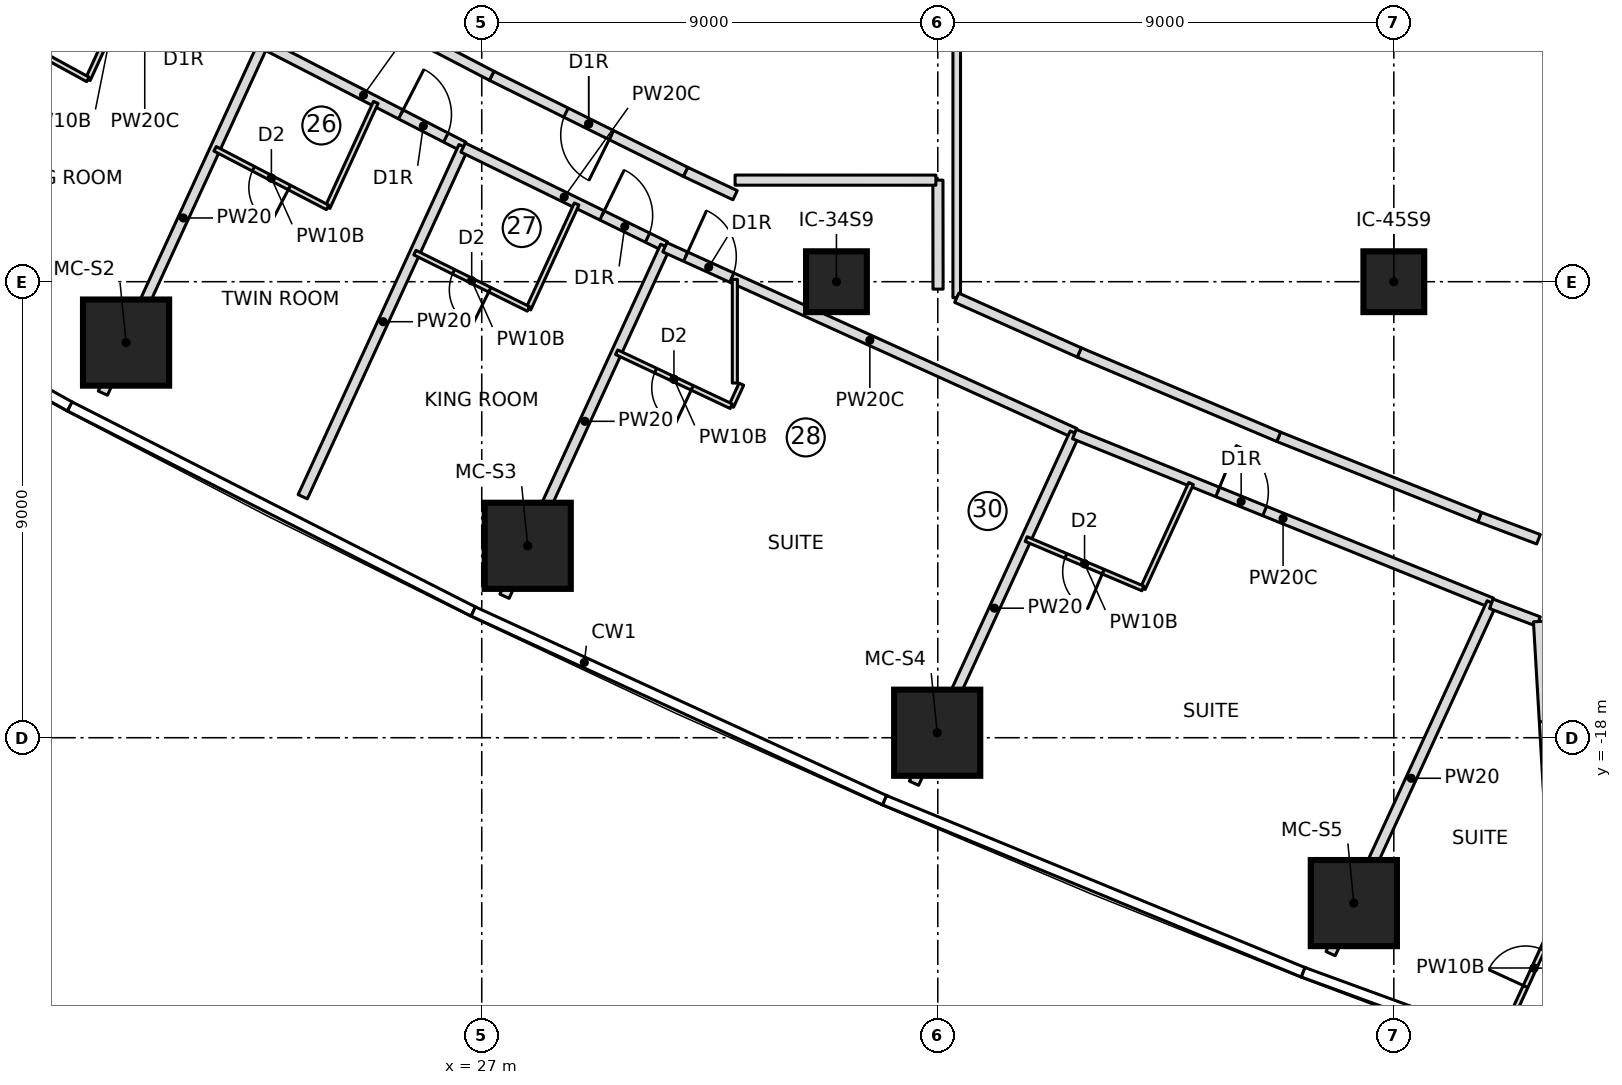
"""IFC4 building model, lengths in metres.
Left out: names, types, materials, properties, quantities, classifications, styles, units other than length and angle.
Written with IfcOpenShell. Run it as: python <this file> out.ifc"""

import sys

from ifc_helpers import new_model, si_unit, direction, frame, frame_2d, origin, origin_2d, place, context, subcontext, project, spatial, rectangle, extrude, element, fill, save


model = new_model("IFC4")
c1 = context("Model", 3, precision=1e-05, world=origin(), true_north=direction((0.0, 1.0)))
c2 = subcontext(c1, "Body", "Model", "MODEL_VIEW")
j1 = project(units=[si_unit("LENGTHUNIT", "METRE"), si_unit("PLANEANGLEUNIT", "RADIAN")], contexts=[c1])
p1 = place(None, origin())
s1 = spatial("IfcSite", under=j1, at=p1, CompositionType="ELEMENT")
p2 = place(p1, origin())
s2 = spatial("IfcBuilding", under=s1, at=p2, CompositionType="ELEMENT")
p3 = place(p2, frame((0.0, 0.0, 95.55)))
s3 = spatial("IfcBuildingStorey", under=s2, at=p3, CompositionType="ELEMENT", Elevation=95.55)
for number, where, z_axis, x_axis in (
    (1, (19.981, -10.202, 0.0), (0.0, 0.0, 1.0), (1.0, 0.0, 0.0)),
    (2, (27.907, -14.212, 0.0), (0.0, 0.0, 1.0), (1.0, 0.0, 0.0)),
    (3, (35.988, -17.902, 0.0), (0.0, 0.0, 1.0), (1.0, 0.0, 0.0)),
    (4, (44.211, -21.264, 0.0), (0.0, 0.0, 1.0), (1.0, 0.0, 0.0)),
):
    element("IfcColumn", number, at=place(p3, frame(where, z_axis=z_axis, x_axis=x_axis)), inside=s3, PredefinedType="COLUMN", context=c2, shape_type="SweptSolid", body=[
        extrude(rectangle(XDim=1.7, YDim=1.7, at=origin_2d()), origin(), (0.0, 0.0, 1.0), 3.55),
    ])
for number, where, z_axis, x_axis in (
    (5, (34.0, -9.0, 0.0), (0.0, 0.0, 1.0), (1.0, 0.0, 0.0)),
    (6, (45.0, -9.0, 0.0), (0.0, 0.0, 1.0), (1.0, 0.0, 0.0)),
):
    element("IfcColumn", number, at=place(p3, frame(where, z_axis=z_axis, x_axis=x_axis)), inside=s3, PredefinedType="COLUMN", context=c2, shape_type="SweptSolid", body=[
        extrude(rectangle(XDim=1.2, YDim=1.2, at=origin_2d()), origin(), (0.0, 0.0, 1.0), 3.55),
    ])
p4 = place(p3, frame((20.18, -2.934, 0.0), z_axis=(0.0, 0.0, 1.0), x_axis=(-0.417450047292, -0.908699872354, 0.0)))
e7 = element("IfcWall", 7, at=p4, inside=s3, PredefinedType="PARTITIONING", context=c2, shape_type="SweptSolid", body=[
    extrude(rectangle(XDim=2.283, YDim=0.1, at=frame_2d((1.141, 0.0))), origin(), (0.0, 0.0, 1.0), 3.25),
])
p5 = place(p4, frame((0.75, 0.0, 0.0)))
e8 = element("IfcOpeningElement", 8, at=p5, cuts=e7, PredefinedType="OPENING", context=c2, shape_type="SweptSolid", body=[
    extrude(rectangle(XDim=0.8, YDim=2.1, at=frame_2d((0.4, 1.05))), frame((0.0, 0.06, 0.0), z_axis=(0.0, -1.0, 0.0), x_axis=(1.0, 0.0, 0.0)), (0.0, 0.0, 1.0), 0.12),
])
p6 = place(p3, frame((19.228, -5.008, 0.0), z_axis=(0.0, 0.0, 1.0), x_axis=(-0.877424481957, 0.479714788663, 0.0)))
e9 = element("IfcWall", 9, at=p6, inside=s3, PredefinedType="PARTITIONING", context=c2, shape_type="SweptSolid", body=[
    extrude(rectangle(XDim=1.625, YDim=0.1, at=frame_2d((0.813, 0.0))), origin(), (0.0, 0.0, 1.0), 3.25),
])
p7 = place(p3, frame((19.522, -11.199, 0.0), z_axis=(0.0, 0.0, 1.0), x_axis=(0.417413534969, 0.908716644959, 0.0)))
e10 = element("IfcWall", 10, at=p7, inside=s3, PredefinedType="PARTITIONING", context=c2, shape_type="SweptSolid", body=[
    extrude(rectangle(XDim=7.609, YDim=0.2, at=frame_2d((3.805, 0.0))), origin(), (0.0, 0.0, 1.0), 3.25),
])
p8 = place(p3, frame((22.69, -4.302, 0.0), z_axis=(0.0, 0.0, 1.0), x_axis=(0.889236075961, -0.457448577667, 0.0)))
e11 = element("IfcWall", 11, at=p8, inside=s3, PredefinedType="PARTITIONING", context=c2, shape_type="SweptSolid", body=[
    extrude(rectangle(XDim=4.443, YDim=0.2, at=frame_2d((2.222, 0.0))), origin(), (0.0, 0.0, 1.0), 3.25),
])
p9 = place(p8, frame((3.05, 0.0, 0.0)))
e12 = element("IfcOpeningElement", 12, at=p9, cuts=e11, PredefinedType="OPENING", context=c2, shape_type="SweptSolid", body=[
    extrude(rectangle(XDim=1.0, YDim=2.1, at=frame_2d((0.5, 1.05))), frame((0.0, 0.11, 0.0), z_axis=(0.0, -1.0, 0.0), x_axis=(1.0, 0.0, 0.0)), (0.0, 0.0, 1.0), 0.22),
])
p10 = place(p3, frame((24.909, -5.462, 0.0), z_axis=(0.0, 0.0, 1.0), x_axis=(-0.417454762401, -0.908697706253, 0.0)))
e13 = element("IfcWall", 13, at=p10, inside=s3, PredefinedType="PARTITIONING", context=c2, shape_type="SweptSolid", body=[
    extrude(rectangle(XDim=2.28, YDim=0.1, at=frame_2d((1.14, 0.0))), origin(), (0.0, 0.0, 1.0), 3.25),
])
p11 = place(p3, frame((23.958, -7.533, 0.0), z_axis=(0.0, 0.0, 1.0), x_axis=(-0.886911586599, 0.461939214135, 0.0)))
e14 = element("IfcWall", 14, at=p11, inside=s3, PredefinedType="PARTITIONING", context=c2, shape_type="SweptSolid", body=[
    extrude(rectangle(XDim=2.503, YDim=0.1, at=frame_2d((1.251, 0.0))), origin(), (0.0, 0.0, 1.0), 3.25),
])
p12 = place(p11, frame((0.85, 0.0, 0.0)))
e15 = element("IfcOpeningElement", 15, at=p12, cuts=e14, PredefinedType="OPENING", context=c2, shape_type="SweptSolid", body=[
    extrude(rectangle(XDim=0.8, YDim=2.1, at=frame_2d((0.4, 1.05))), frame((0.0, 0.06, 0.0), z_axis=(0.0, -1.0, 0.0), x_axis=(1.0, 0.0, 0.0)), (0.0, 0.0, 1.0), 0.12),
])
p13 = place(p3, frame((23.467, -13.244, 0.0), z_axis=(0.0, 0.0, 1.0), x_axis=(0.417455028008, 0.908697584233, 0.0)))
e16 = element("IfcWall", 16, at=p13, inside=s3, PredefinedType="PARTITIONING", context=c2, shape_type="SweptSolid", body=[
    extrude(rectangle(XDim=7.603, YDim=0.2, at=frame_2d((3.802, 0.0))), origin(), (0.0, 0.0, 1.0), 3.25),
])
p14 = place(p3, frame((26.633, -6.353, 0.0), z_axis=(0.0, 0.0, 1.0), x_axis=(0.898502457097, -0.438968489291, 0.0)))
e17 = element("IfcWall", 17, at=p14, inside=s3, PredefinedType="PARTITIONING", context=c2, shape_type="SweptSolid", body=[
    extrude(rectangle(XDim=4.44, YDim=0.2, at=frame_2d((2.22, 0.0))), origin(), (0.0, 0.0, 1.0), 3.25),
])
p15 = place(p14, frame((3.05, 0.0, 0.0)))
e18 = element("IfcOpeningElement", 18, at=p15, cuts=e17, PredefinedType="OPENING", context=c2, shape_type="SweptSolid", body=[
    extrude(rectangle(XDim=1.0, YDim=2.1, at=frame_2d((0.5, 1.05))), frame((0.0, 0.11, 0.0), z_axis=(0.0, -1.0, 0.0), x_axis=(1.0, 0.0, 0.0)), (0.0, 0.0, 1.0), 0.22),
])
p16 = place(p3, frame((28.873, -7.467, 0.0), z_axis=(0.0, 0.0, 1.0), x_axis=(-0.417433204355, -0.908707609686, 0.0)))
e19 = element("IfcWall", 19, at=p16, inside=s3, PredefinedType="PARTITIONING", context=c2, shape_type="SweptSolid", body=[
    extrude(rectangle(XDim=2.278, YDim=0.1, at=frame_2d((1.139, 0.0))), origin(), (0.0, 0.0, 1.0), 3.25),
])
p17 = place(p3, frame((27.922, -9.537, 0.0), z_axis=(0.0, 0.0, 1.0), x_axis=(-0.895944857815, 0.444165297784, 0.0)))
e20 = element("IfcWall", 20, at=p17, inside=s3, PredefinedType="PARTITIONING", context=c2, shape_type="SweptSolid", body=[
    extrude(rectangle(XDim=2.501, YDim=0.1, at=frame_2d((1.25, 0.0))), origin(), (0.0, 0.0, 1.0), 3.25),
])
p18 = place(p17, frame((0.85, 0.0, 0.0)))
e21 = element("IfcOpeningElement", 21, at=p18, cuts=e20, PredefinedType="OPENING", context=c2, shape_type="SweptSolid", body=[
    extrude(rectangle(XDim=0.8, YDim=2.1, at=frame_2d((0.4, 1.05))), frame((0.0, 0.06, 0.0), z_axis=(0.0, -1.0, 0.0), x_axis=(1.0, 0.0, 0.0)), (0.0, 0.0, 1.0), 0.12),
])
p19 = place(p3, frame((27.449, -15.208, 0.0), z_axis=(0.0, 0.0, 1.0), x_axis=(0.417429919618, 0.90870911859, 0.0)))
e22 = element("IfcWall", 22, at=p19, inside=s3, PredefinedType="PARTITIONING", context=c2, shape_type="SweptSolid", body=[
    extrude(rectangle(XDim=7.6, YDim=0.2, at=frame_2d((3.8, 0.0))), origin(), (0.0, 0.0, 1.0), 3.25),
])
p20 = place(p3, frame((30.614, -8.32, 0.0), z_axis=(0.0, 0.0, 1.0), x_axis=(0.910751030363, -0.41295588226, 0.0)))
e23 = element("IfcWall", 23, at=p20, inside=s3, PredefinedType="PARTITIONING", context=c2, shape_type="SweptSolid", body=[
    extrude(rectangle(XDim=8.883, YDim=0.2, at=frame_2d((4.442, 0.0))), origin(), (0.0, 0.0, 1.0), 3.25),
])
p21 = place(p20, frame((0.45, 0.0, 0.0)))
e24 = element("IfcOpeningElement", 24, at=p21, cuts=e23, PredefinedType="OPENING", context=c2, shape_type="SweptSolid", body=[
    extrude(rectangle(XDim=1.0, YDim=2.1, at=frame_2d((0.5, 1.05))), frame((0.0, 0.11, 0.0), z_axis=(0.0, -1.0, 0.0), x_axis=(1.0, 0.0, 0.0)), (0.0, 0.0, 1.0), 0.22),
])
p22 = place(p3, frame((32.124, -11.022, 0.0), z_axis=(0.0, 0.0, 1.0), x_axis=(-0.4176025781, -0.908629785316, 0.0)))
e25 = element("IfcWall", 25, at=p22, inside=s3, PredefinedType="PARTITIONING", context=c2, shape_type="SweptSolid", body=[
    extrude(rectangle(XDim=0.479, YDim=0.1, at=frame_2d((0.239, 0.0))), origin(), (0.0, 0.0, 1.0), 3.25),
])
p23 = place(p3, frame((31.924, -11.457, 0.0), z_axis=(0.0, 0.0, 1.0), x_axis=(-0.904688082375, 0.426074493027, 0.0)))
e26 = element("IfcWall", 26, at=p23, inside=s3, PredefinedType="PARTITIONING", context=c2, shape_type="SweptSolid", body=[
    extrude(rectangle(XDim=2.5, YDim=0.1, at=frame_2d((1.25, 0.0))), origin(), (0.0, 0.0, 1.0), 3.25),
])
p24 = place(p23, frame((0.85, 0.0, 0.0)))
e27 = element("IfcOpeningElement", 27, at=p24, cuts=e26, PredefinedType="OPENING", context=c2, shape_type="SweptSolid", body=[
    extrude(rectangle(XDim=0.8, YDim=2.1, at=frame_2d((0.4, 1.05))), frame((0.0, 0.06, 0.0), z_axis=(0.0, -1.0, 0.0), x_axis=(1.0, 0.0, 0.0)), (0.0, 0.0, 1.0), 0.12),
])
p25 = place(p3, frame((35.531, -18.898, 0.0), z_axis=(0.0, 0.0, 1.0), x_axis=(0.417416334044, 0.908715359215, 0.0)))
e28 = element("IfcWall", 28, at=p25, inside=s3, PredefinedType="PARTITIONING", context=c2, shape_type="SweptSolid", body=[
    extrude(rectangle(XDim=7.604, YDim=0.2, at=frame_2d((3.802, 0.0))), origin(), (0.0, 0.0, 1.0), 3.25),
])
p26 = place(p3, frame((38.696, -12.007, 0.0), z_axis=(0.0, 0.0, 1.0), x_axis=(0.927027566285, -0.374993188401, 0.0)))
e29 = element("IfcWall", 29, at=p26, inside=s3, PredefinedType="PARTITIONING", context=c2, shape_type="SweptSolid", body=[
    extrude(rectangle(XDim=8.885, YDim=0.2, at=frame_2d((4.442, 0.0))), origin(), (0.0, 0.0, 1.0), 3.25),
])
p27 = place(p26, frame((3.05, 0.0, 0.0)))
e30 = element("IfcOpeningElement", 30, at=p27, cuts=e29, PredefinedType="OPENING", context=c2, shape_type="SweptSolid", body=[
    extrude(rectangle(XDim=1.0, YDim=2.1, at=frame_2d((0.5, 1.05))), frame((0.0, 0.11, 0.0), z_axis=(0.0, -1.0, 0.0), x_axis=(1.0, 0.0, 0.0)), (0.0, 0.0, 1.0), 0.22),
])
p28 = place(p3, frame((40.999, -12.984, 0.0), z_axis=(0.0, 0.0, 1.0), x_axis=(-0.417433204355, -0.908707609686, 0.0)))
e31 = element("IfcWall", 31, at=p28, inside=s3, PredefinedType="PARTITIONING", context=c2, shape_type="SweptSolid", body=[
    extrude(rectangle(XDim=2.278, YDim=0.1, at=frame_2d((1.139, 0.0))), origin(), (0.0, 0.0, 1.0), 3.25),
])
p29 = place(p3, frame((40.048, -15.054, 0.0), z_axis=(0.0, 0.0, 1.0), x_axis=(-0.921042675983, 0.38946166566, 0.0)))
e32 = element("IfcWall", 32, at=p29, inside=s3, PredefinedType="PARTITIONING", context=c2, shape_type="SweptSolid", body=[
    extrude(rectangle(XDim=2.501, YDim=0.1, at=frame_2d((1.25, 0.0))), origin(), (0.0, 0.0, 1.0), 3.25),
])
p30 = place(p29, frame((0.85, 0.0, 0.0)))
e33 = element("IfcOpeningElement", 33, at=p30, cuts=e32, PredefinedType="OPENING", context=c2, shape_type="SweptSolid", body=[
    extrude(rectangle(XDim=0.8, YDim=2.1, at=frame_2d((0.4, 1.05))), frame((0.0, 0.06, 0.0), z_axis=(0.0, -1.0, 0.0), x_axis=(1.0, 0.0, 0.0)), (0.0, 0.0, 1.0), 0.12),
])
p31 = place(p3, frame((43.752, -22.262, 0.0), z_axis=(0.0, 0.0, 1.0), x_axis=(0.417437957167, 0.908705426371, 0.0)))
e34 = element("IfcWall", 34, at=p31, inside=s3, PredefinedType="PARTITIONING", context=c2, shape_type="SweptSolid", body=[
    extrude(rectangle(XDim=7.619, YDim=0.2, at=frame_2d((3.81, 0.0))), origin(), (0.0, 0.0, 1.0), 3.25),
])
p32 = place(p3, frame((47.286, -23.592, 0.0), z_axis=(0.0, 0.0, 1.0), x_axis=(0.41749308293, 0.908680100864, 0.0)))
e35 = element("IfcWall", 35, at=p32, inside=s3, PredefinedType="PARTITIONING", context=c2, shape_type="SweptSolid", body=[
    extrude(rectangle(XDim=2.306, YDim=0.1, at=frame_2d((1.153, 0.0))), origin(), (0.0, 0.0, 1.0), 3.25),
])
p33 = place(p32, frame((0.75, 0.0, 0.0)))
e36 = element("IfcOpeningElement", 36, at=p33, cuts=e35, PredefinedType="OPENING", context=c2, shape_type="SweptSolid", body=[
    extrude(rectangle(XDim=0.8, YDim=2.1, at=frame_2d((0.4, 1.05))), frame((0.0, 0.06, 0.0), z_axis=(0.0, -1.0, 0.0), x_axis=(1.0, 0.0, 0.0)), (0.0, 0.0, 1.0), 0.12),
])
p34 = place(p3, frame((31.025, -6.833, 0.0), z_axis=(0.0, 0.0, 1.0), x_axis=(-0.895975836328, 0.44410280422, 0.0)))
e37 = element("IfcWall", 37, at=p34, inside=s3, PredefinedType="PARTITIONING", context=c2, shape_type="SweptSolid", body=[
    extrude(rectangle(XDim=4.273, YDim=0.2, at=frame_2d((2.137, 0.0))), origin(), (0.0, 0.0, 1.0), 3.25),
])
p35 = place(p34, frame((1.636, 0.0, 0.0)))
e38 = element("IfcOpeningElement", 38, at=p35, cuts=e37, PredefinedType="OPENING", context=c2, shape_type="SweptSolid", body=[
    extrude(rectangle(XDim=1.0, YDim=2.1, at=frame_2d((0.5, 1.05))), frame((0.0, 0.11, 0.0), z_axis=(0.0, -1.0, 0.0), x_axis=(1.0, 0.0, 0.0)), (0.0, 0.0, 1.0), 0.22),
])
p36 = place(p3, frame((32.0, -7.293, 0.0), z_axis=(0.0, 0.0, 1.0), x_axis=(-0.904690325494, 0.426069730159, 0.0)))
e39 = element("IfcWall", 39, at=p36, inside=s3, PredefinedType="PARTITIONING", context=c2, shape_type="SweptSolid", body=[
    extrude(rectangle(XDim=1.078, YDim=0.2, at=frame_2d((0.539, 0.0))), origin(), (0.0, 0.0, 1.0), 3.25),
])
p37 = place(p3, frame((27.196, -4.936, 0.0), z_axis=(0.0, 0.0, 1.0), x_axis=(-0.886905549588, 0.461950804859, 0.0)))
e40 = element("IfcWall", 40, at=p37, inside=s3, PredefinedType="PARTITIONING", context=c2, shape_type="SweptSolid", body=[
    extrude(rectangle(XDim=2.93, YDim=0.2, at=frame_2d((1.465, 0.0))), origin(), (0.0, 0.0, 1.0), 3.25),
])
p38 = place(p3, frame((36.374, -9.317, 0.0), z_axis=(0.0, 0.0, 1.0), x_axis=(0.0, 1.0, 0.0)))
e41 = element("IfcWall", 41, at=p38, inside=s3, PredefinedType="PARTITIONING", context=c2, shape_type="SweptSolid", body=[
    extrude(rectangle(XDim=18.634, YDim=0.15, at=frame_2d((9.317, 0.0))), origin(), (0.0, 0.0, 1.0), 3.25),
])
p39 = place(p3, frame((46.696, -13.647, 0.0), z_axis=(0.0, 0.0, 1.0), x_axis=(-0.928638161177, 0.370986745864, 0.0)))
e42 = element("IfcWall", 42, at=p39, inside=s3, PredefinedType="PARTITIONING", context=c2, shape_type="SweptSolid", body=[
    extrude(rectangle(XDim=4.273, YDim=0.2, at=frame_2d((2.136, 0.0))), origin(), (0.0, 0.0, 1.0), 3.25),
])
p40 = place(p3, frame((42.728, -12.062, 0.0), z_axis=(0.0, 0.0, 1.0), x_axis=(-0.921037415532, 0.389474105929, 0.0)))
e43 = element("IfcWall", 43, at=p40, inside=s3, PredefinedType="PARTITIONING", context=c2, shape_type="SweptSolid", body=[
    extrude(rectangle(XDim=4.273, YDim=0.2, at=frame_2d((2.137, 0.0))), origin(), (0.0, 0.0, 1.0), 3.25),
])
p41 = place(p3, frame((38.792, -10.397, 0.0), z_axis=(0.0, 0.0, 1.0), x_axis=(-0.913030623494, 0.407891015544, 0.0)))
e44 = element("IfcWall", 44, at=p41, inside=s3, PredefinedType="PARTITIONING", context=c2, shape_type="SweptSolid", body=[
    extrude(rectangle(XDim=2.648, YDim=0.2, at=frame_2d((1.324, 0.0))), origin(), (0.0, 0.0, 1.0), 3.25),
])
p42 = place(p3, frame((31.995, -8.954, 0.0), z_axis=(0.0, 0.0, 1.0), x_axis=(0.0, -1.0, 0.0)))
e45 = element("IfcWall", 45, at=p42, inside=s3, PredefinedType="PARTITIONING", context=c2, shape_type="SweptSolid", body=[
    extrude(rectangle(XDim=2.046, YDim=0.1, at=frame_2d((1.023, 0.0))), origin(), (0.0, 0.0, 1.0), 3.25),
])
p43 = place(p3, frame((46.924, -15.357, 0.0), z_axis=(0.0, 0.0, 1.0), x_axis=(0.935803526171, -0.35252199989, 0.0)))
e46 = element("IfcWall", 46, at=p43, inside=s3, PredefinedType="PARTITIONING", context=c2, shape_type="SweptSolid", body=[
    extrude(rectangle(XDim=0.995, YDim=0.2, at=frame_2d((0.497, 0.0))), origin(), (0.0, 0.0, 1.0), 3.25),
])
p44 = place(p3, frame((47.855, -14.083, 0.0), z_axis=(0.0, 0.0, 1.0), x_axis=(-0.935907269358, 0.352246480696, 0.0)))
e47 = element("IfcWall", 47, at=p44, inside=s3, PredefinedType="PARTITIONING", context=c2, shape_type="SweptSolid", body=[
    extrude(rectangle(XDim=1.239, YDim=0.2, at=frame_2d((0.619, 0.0))), origin(), (0.0, 0.0, 1.0), 3.25),
])
p45 = place(p3, frame((47.855, -15.707, 0.0), z_axis=(0.0, 0.0, 1.0), x_axis=(0.058568850083, -0.998283371493, 0.0)))
e48 = element("IfcWall", 48, at=p45, inside=s3, PredefinedType="PARTITIONING", context=c2, shape_type="SweptSolid", body=[
    extrude(rectangle(XDim=4.952, YDim=0.2, at=frame_2d((2.476, 0.0))), origin(), (0.0, 0.0, 1.0), 3.25),
])
p46 = place(p45, frame((1.976, 0.0, 0.0)))
e49 = element("IfcOpeningElement", 49, at=p46, cuts=e48, PredefinedType="OPENING", context=c2, shape_type="SweptSolid", body=[
    extrude(rectangle(XDim=1.0, YDim=2.1, at=frame_2d((0.5, 1.05))), frame((0.0, 0.11, 0.0), z_axis=(0.0, -1.0, 0.0), x_axis=(1.0, 0.0, 0.0)), (0.0, 0.0, 1.0), 0.22),
])
p47 = place(p3, frame((36.005, -9.146, 0.0), z_axis=(0.0, 0.0, 1.0), x_axis=(-0.001135073049, 0.999999355804, 0.0)))
e50 = element("IfcWall", 50, at=p47, inside=s3, PredefinedType="PARTITIONING", context=c2, shape_type="SweptSolid", body=[
    extrude(rectangle(XDim=2.151, YDim=0.2, at=frame_2d((1.075, 0.0))), origin(), (0.0, 0.0, 1.0), 3.25),
])
p48 = place(p3, frame((35.962, -6.996, 0.0), z_axis=(0.0, 0.0, 1.0), x_axis=(-0.999999992409, 0.000123213405, 0.0)))
e51 = element("IfcWall", 51, at=p48, inside=s3, PredefinedType="PARTITIONING", context=c2, shape_type="SweptSolid", body=[
    extrude(rectangle(XDim=3.963, YDim=0.2, at=frame_2d((1.981, 0.0))), origin(), (0.0, 0.0, 1.0), 3.25),
])
p49 = place(p12, origin())
e52 = element("IfcDoor", 52, at=p49, inside=s3, OperationType="SINGLE_SWING_LEFT", PredefinedType="DOOR", context=c2, shape_type="SweptSolid", body=[
    extrude(rectangle(XDim=0.8, YDim=2.1, at=frame_2d((0.4, 1.05))), frame((0.0, 0.025, 0.0), z_axis=(0.0, -1.0, 0.0), x_axis=(1.0, 0.0, 0.0)), (0.0, 0.0, 1.0), 0.05),
])
fill(e15, e52)
p50 = place(p9, origin())
e53 = element("IfcDoor", 53, at=p50, inside=s3, OperationType="SINGLE_SWING_RIGHT", PredefinedType="DOOR", context=c2, shape_type="SweptSolid", body=[
    extrude(rectangle(XDim=1.0, YDim=2.1, at=frame_2d((0.5, 1.05))), frame((0.0, 0.025, 0.0), z_axis=(0.0, -1.0, 0.0), x_axis=(1.0, 0.0, 0.0)), (0.0, 0.0, 1.0), 0.05),
])
fill(e12, e53)
p51 = place(p18, origin())
e54 = element("IfcDoor", 54, at=p51, inside=s3, OperationType="SINGLE_SWING_LEFT", PredefinedType="DOOR", context=c2, shape_type="SweptSolid", body=[
    extrude(rectangle(XDim=0.8, YDim=2.1, at=frame_2d((0.4, 1.05))), frame((0.0, 0.025, 0.0), z_axis=(0.0, -1.0, 0.0), x_axis=(1.0, 0.0, 0.0)), (0.0, 0.0, 1.0), 0.05),
])
fill(e21, e54)
p52 = place(p15, origin())
e55 = element("IfcDoor", 55, at=p52, inside=s3, OperationType="SINGLE_SWING_RIGHT", PredefinedType="DOOR", context=c2, shape_type="SweptSolid", body=[
    extrude(rectangle(XDim=1.0, YDim=2.1, at=frame_2d((0.5, 1.05))), frame((0.0, 0.025, 0.0), z_axis=(0.0, -1.0, 0.0), x_axis=(1.0, 0.0, 0.0)), (0.0, 0.0, 1.0), 0.05),
])
fill(e18, e55)
p53 = place(p24, origin())
e56 = element("IfcDoor", 56, at=p53, inside=s3, OperationType="SINGLE_SWING_LEFT", PredefinedType="DOOR", context=c2, shape_type="SweptSolid", body=[
    extrude(rectangle(XDim=0.8, YDim=2.1, at=frame_2d((0.4, 1.05))), frame((0.0, 0.025, 0.0), z_axis=(0.0, -1.0, 0.0), x_axis=(1.0, 0.0, 0.0)), (0.0, 0.0, 1.0), 0.05),
])
fill(e27, e56)
p54 = place(p21, origin())
e57 = element("IfcDoor", 57, at=p54, inside=s3, OperationType="SINGLE_SWING_RIGHT", PredefinedType="DOOR", context=c2, shape_type="SweptSolid", body=[
    extrude(rectangle(XDim=1.0, YDim=2.1, at=frame_2d((0.5, 1.05))), frame((0.0, 0.025, 0.0), z_axis=(0.0, -1.0, 0.0), x_axis=(1.0, 0.0, 0.0)), (0.0, 0.0, 1.0), 0.05),
])
fill(e24, e57)
p55 = place(p30, origin())
e58 = element("IfcDoor", 58, at=p55, inside=s3, OperationType="SINGLE_SWING_LEFT", PredefinedType="DOOR", context=c2, shape_type="SweptSolid", body=[
    extrude(rectangle(XDim=0.8, YDim=2.1, at=frame_2d((0.4, 1.05))), frame((0.0, 0.025, 0.0), z_axis=(0.0, -1.0, 0.0), x_axis=(1.0, 0.0, 0.0)), (0.0, 0.0, 1.0), 0.05),
])
fill(e33, e58)
p56 = place(p27, origin())
e59 = element("IfcDoor", 59, at=p56, inside=s3, OperationType="SINGLE_SWING_RIGHT", PredefinedType="DOOR", context=c2, shape_type="SweptSolid", body=[
    extrude(rectangle(XDim=1.0, YDim=2.1, at=frame_2d((0.5, 1.05))), frame((0.0, 0.025, 0.0), z_axis=(0.0, -1.0, 0.0), x_axis=(1.0, 0.0, 0.0)), (0.0, 0.0, 1.0), 0.05),
])
fill(e30, e59)
p57 = place(p33, origin())
e60 = element("IfcDoor", 60, at=p57, inside=s3, OperationType="SINGLE_SWING_LEFT", PredefinedType="DOOR", context=c2, shape_type="SweptSolid", body=[
    extrude(rectangle(XDim=0.8, YDim=2.1, at=frame_2d((0.4, 1.05))), frame((0.0, 0.025, 0.0), z_axis=(0.0, -1.0, 0.0), x_axis=(1.0, 0.0, 0.0)), (0.0, 0.0, 1.0), 0.05),
])
fill(e36, e60)
p58 = place(p35, origin())
e61 = element("IfcDoor", 61, at=p58, inside=s3, OperationType="SINGLE_SWING_RIGHT", PredefinedType="DOOR", context=c2, shape_type="SweptSolid", body=[
    extrude(rectangle(XDim=1.0, YDim=2.1, at=frame_2d((0.5, 1.05))), frame((0.0, 0.025, 0.0), z_axis=(0.0, -1.0, 0.0), x_axis=(1.0, 0.0, 0.0)), (0.0, 0.0, 1.0), 0.05),
])
fill(e38, e61)
save(model, sys.argv[1])
